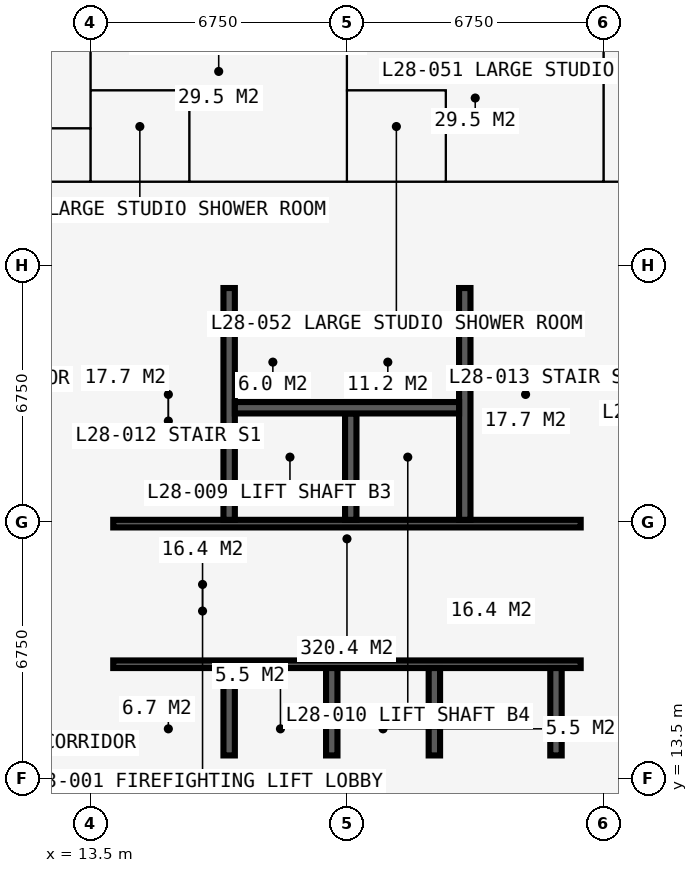
"""IFC4 building model, lengths in metres.
Left out: names, types, materials, properties, quantities, classifications, styles, units other than length and angle.
Written with IfcOpenShell. Run it as: python <this file> out.ifc"""

import sys

from ifc_helpers import new_model, si_unit, direction, frame, frame_2d, origin, place, context, subcontext, project, spatial, rectangle, extrude, element, fill, save


model = new_model("IFC4")
c1 = context("Model", 3, precision=1e-05, world=origin(), true_north=direction((0.0, 1.0)))
c2 = subcontext(c1, "Body", "Model", "MODEL_VIEW")
j1 = project(units=[si_unit("LENGTHUNIT", "METRE"), si_unit("PLANEANGLEUNIT", "RADIAN")], contexts=[c1])
p1 = place(None, origin())
s1 = spatial("IfcSite", under=j1, at=p1, CompositionType="ELEMENT")
p2 = place(p1, origin())
s2 = spatial("IfcBuilding", under=s1, at=p2, CompositionType="ELEMENT")
p3 = place(p2, frame((0.0, 0.0, 105.3)))
s3 = spatial("IfcBuildingStorey", under=s2, at=p3, CompositionType="ELEMENT", Elevation=105.3)
p4 = place(p3, frame((12.9, 13.5, 0.0), z_axis=(0.0, 0.0, 1.0), x_axis=(1.0, 0.0, 0.0)))
e1 = element("IfcWall", 1, at=p4, inside=s3, PredefinedType="SHEAR", context=c2, shape_type="SweptSolid", body=[
    extrude(rectangle(XDim=14.7, YDim=1.2, at=frame_2d((7.35, 0.0))), origin(), (0.0, 0.0, 1.0), 3.6),
])
p5 = place(p3, frame((27.0, 14.1, 0.0), z_axis=(0.0, 0.0, 1.0), x_axis=(0.0, 1.0, 0.0)))
e2 = element("IfcWall", 2, at=p5, inside=s3, PredefinedType="SHEAR", context=c2, shape_type="SweptSolid", body=[
    extrude(rectangle(XDim=12.3, YDim=1.2, at=frame_2d((6.15, 0.0))), origin(), (0.0, 0.0, 1.0), 3.6),
])
p6 = place(p5, frame((3.65, 0.0, 0.0)))
e3 = element("IfcOpeningElement", 3, at=p6, cuts=e2, PredefinedType="OPENING", context=c2, shape_type="SweptSolid", body=[
    extrude(rectangle(XDim=1.2, YDim=2.2, at=frame_2d((0.6, 1.1))), frame((0.0, 0.61, 0.0), z_axis=(0.0, -1.0, 0.0), x_axis=(1.0, 0.0, 0.0)), (0.0, 0.0, 1.0), 1.22),
])
p7 = place(p3, frame((27.6, 27.0, 0.0), z_axis=(0.0, 0.0, 1.0), x_axis=(-1.0, 0.0, 0.0)))
e4 = element("IfcWall", 4, at=p7, inside=s3, PredefinedType="SHEAR", context=c2, shape_type="SweptSolid", body=[
    extrude(rectangle(XDim=14.7, YDim=1.2, at=frame_2d((7.35, 0.0))), origin(), (0.0, 0.0, 1.0), 3.6),
])
p8 = place(p7, frame((5.225, 0.0, 0.0)))
e5 = element("IfcOpeningElement", 5, at=p8, cuts=e4, PredefinedType="OPENING", context=c2, shape_type="SweptSolid", body=[
    extrude(rectangle(XDim=0.9, YDim=2.2, at=frame_2d((0.45, 1.1))), frame((0.0, 0.61, 0.0), z_axis=(0.0, -1.0, 0.0), x_axis=(1.0, 0.0, 0.0)), (0.0, 0.0, 1.0), 1.22),
])
p9 = place(p7, frame((8.2, 0.0, 0.0)))
e6 = element("IfcOpeningElement", 6, at=p9, cuts=e4, PredefinedType="OPENING", context=c2, shape_type="SweptSolid", body=[
    extrude(rectangle(XDim=1.0, YDim=2.2, at=frame_2d((0.5, 1.1))), frame((0.0, 0.61, 0.0), z_axis=(0.0, -1.0, 0.0), x_axis=(1.0, 0.0, 0.0)), (0.0, 0.0, 1.0), 1.22),
])
p10 = place(p3, frame((13.5, 26.4, 0.0), z_axis=(0.0, 0.0, 1.0), x_axis=(0.0, -1.0, 0.0)))
e7 = element("IfcWall", 7, at=p10, inside=s3, PredefinedType="SHEAR", context=c2, shape_type="SweptSolid", body=[
    extrude(rectangle(XDim=12.3, YDim=1.2, at=frame_2d((6.15, 0.0))), origin(), (0.0, 0.0, 1.0), 3.6),
])
p11 = place(p10, frame((7.45, 0.0, 0.0)))
e8 = element("IfcOpeningElement", 8, at=p11, cuts=e7, PredefinedType="OPENING", context=c2, shape_type="SweptSolid", body=[
    extrude(rectangle(XDim=1.2, YDim=2.2, at=frame_2d((0.6, 1.1))), frame((0.0, 0.61, 0.0), z_axis=(0.0, -1.0, 0.0), x_axis=(1.0, 0.0, 0.0)), (0.0, 0.0, 1.0), 1.22),
])
p12 = place(p3, frame((14.1, 16.5, 0.0), z_axis=(0.0, 0.0, 1.0), x_axis=(1.0, 0.0, 0.0)))
e9 = element("IfcWall", 9, at=p12, inside=s3, PredefinedType="SHEAR", context=c2, shape_type="SweptSolid", body=[
    extrude(rectangle(XDim=12.3, YDim=0.2, at=frame_2d((6.15, 0.0))), origin(), (0.0, 0.0, 1.0), 3.6),
])
p13 = place(p12, frame((0.9, 0.0, 0.0)))
e10 = element("IfcOpeningElement", 10, at=p13, cuts=e9, PredefinedType="OPENING", context=c2, shape_type="SweptSolid", body=[
    extrude(rectangle(XDim=1.1, YDim=2.2, at=frame_2d((0.55, 1.1))), frame((0.0, 0.11, 0.0), z_axis=(0.0, -1.0, 0.0), x_axis=(1.0, 0.0, 0.0)), (0.0, 0.0, 1.0), 0.22),
])
p14 = place(p12, frame((9.5, 0.0, 0.0)))
e11 = element("IfcOpeningElement", 11, at=p14, cuts=e9, PredefinedType="OPENING", context=c2, shape_type="SweptSolid", body=[
    extrude(rectangle(XDim=1.1, YDim=2.2, at=frame_2d((0.55, 1.1))), frame((0.0, 0.11, 0.0), z_axis=(0.0, -1.0, 0.0), x_axis=(1.0, 0.0, 0.0)), (0.0, 0.0, 1.0), 0.22),
])
p15 = place(p3, frame((14.1, 20.2, 0.0), z_axis=(0.0, 0.0, 1.0), x_axis=(1.0, 0.0, 0.0)))
e12 = element("IfcWall", 12, at=p15, inside=s3, PredefinedType="SHEAR", context=c2, shape_type="SweptSolid", body=[
    extrude(rectangle(XDim=12.3, YDim=0.2, at=frame_2d((6.15, 0.0))), origin(), (0.0, 0.0, 1.0), 3.6),
])
p16 = place(p15, frame((0.35, 0.0, 0.0)))
e13 = element("IfcOpeningElement", 13, at=p16, cuts=e12, PredefinedType="OPENING", context=c2, shape_type="SweptSolid", body=[
    extrude(rectangle(XDim=1.1, YDim=2.2, at=frame_2d((0.55, 1.1))), frame((0.0, 0.11, 0.0), z_axis=(0.0, -1.0, 0.0), x_axis=(1.0, 0.0, 0.0)), (0.0, 0.0, 1.0), 0.22),
])
p17 = place(p15, frame((9.75, 0.0, 0.0)))
e14 = element("IfcOpeningElement", 14, at=p17, cuts=e12, PredefinedType="OPENING", context=c2, shape_type="SweptSolid", body=[
    extrude(rectangle(XDim=1.1, YDim=2.2, at=frame_2d((0.55, 1.1))), frame((0.0, 0.11, 0.0), z_axis=(0.0, -1.0, 0.0), x_axis=(1.0, 0.0, 0.0)), (0.0, 0.0, 1.0), 0.22),
])
for number, where, z_axis, x_axis in (
    (15, (17.15, 20.3, 0.0), (0.0, 0.0, 1.0), (0.0, 1.0, 0.0)),
    (16, (23.35, 20.3, 0.0), (0.0, 0.0, 1.0), (0.0, 1.0, 0.0)),
):
    element("IfcWall", number, at=place(p3, frame(where, z_axis=z_axis, x_axis=x_axis)), inside=s3, PredefinedType="SHEAR", context=c2, shape_type="SweptSolid", body=[
        extrude(rectangle(XDim=6.1, YDim=0.3, at=frame_2d((3.05, 0.0))), origin(), (0.0, 0.0, 1.0), 3.6),
    ])
p18 = place(p3, frame((20.35, 20.3, 0.0), z_axis=(0.0, 0.0, 1.0), x_axis=(0.0, 1.0, 0.0)))
e17 = element("IfcWall", 17, at=p18, inside=s3, PredefinedType="SHEAR", context=c2, shape_type="SweptSolid", body=[
    extrude(rectangle(XDim=2.8, YDim=0.3, at=frame_2d((1.4, 0.0))), origin(), (0.0, 0.0, 1.0), 3.6),
])
p19 = place(p3, frame((17.3, 23.25, 0.0), z_axis=(0.0, 0.0, 1.0), x_axis=(1.0, 0.0, 0.0)))
e18 = element("IfcWall", 18, at=p19, inside=s3, PredefinedType="SHEAR", context=c2, shape_type="SweptSolid", body=[
    extrude(rectangle(XDim=5.9, YDim=0.3, at=frame_2d((2.95, 0.0))), origin(), (0.0, 0.0, 1.0), 3.6),
])
for number, where, z_axis, x_axis in (
    (19, (17.15, 14.1, 0.0), (0.0, 0.0, 1.0), (0.0, 1.0, 0.0)),
    (20, (19.85, 14.1, 0.0), (0.0, 0.0, 1.0), (0.0, 1.0, 0.0)),
    (21, (22.55, 14.1, 0.0), (0.0, 0.0, 1.0), (0.0, 1.0, 0.0)),
    (22, (25.75, 14.1, 0.0), (0.0, 0.0, 1.0), (0.0, 1.0, 0.0)),
):
    element("IfcWall", number, at=place(p3, frame(where, z_axis=z_axis, x_axis=x_axis)), inside=s3, PredefinedType="SHEAR", context=c2, shape_type="SweptSolid", body=[
        extrude(rectangle(XDim=2.3, YDim=0.3, at=frame_2d((1.15, 0.0))), origin(), (0.0, 0.0, 1.0), 3.6),
    ])
p20 = place(p3, frame((18.875, 16.6, 0.0), z_axis=(0.0, 0.0, 1.0), x_axis=(0.0, 1.0, 0.0)))
e23 = element("IfcWall", 23, at=p20, inside=s3, PredefinedType="PARTITIONING", context=c2, shape_type="SweptSolid", body=[
    extrude(rectangle(XDim=3.5, YDim=0.15, at=frame_2d((1.75, 0.0))), origin(), (0.0, 0.0, 1.0), 3.375),
])
p21 = place(p20, frame((1.15, 0.0, 0.0)))
e24 = element("IfcOpeningElement", 24, at=p21, cuts=e23, PredefinedType="OPENING", context=c2, shape_type="SweptSolid", body=[
    extrude(rectangle(XDim=1.2, YDim=2.2, at=frame_2d((0.6, 1.1))), frame((0.0, 0.085, 0.0), z_axis=(0.0, -1.0, 0.0), x_axis=(1.0, 0.0, 0.0)), (0.0, 0.0, 1.0), 0.17),
])
p22 = place(p3, frame((21.625, 16.6, 0.0), z_axis=(0.0, 0.0, 1.0), x_axis=(0.0, 1.0, 0.0)))
e25 = element("IfcWall", 25, at=p22, inside=s3, PredefinedType="PARTITIONING", context=c2, shape_type="SweptSolid", body=[
    extrude(rectangle(XDim=3.5, YDim=0.15, at=frame_2d((1.75, 0.0))), origin(), (0.0, 0.0, 1.0), 3.375),
])
p23 = place(p22, frame((1.15, 0.0, 0.0)))
e26 = element("IfcOpeningElement", 26, at=p23, cuts=e25, PredefinedType="OPENING", context=c2, shape_type="SweptSolid", body=[
    extrude(rectangle(XDim=1.2, YDim=2.2, at=frame_2d((0.6, 1.1))), frame((0.0, 0.085, 0.0), z_axis=(0.0, -1.0, 0.0), x_axis=(1.0, 0.0, 0.0)), (0.0, 0.0, 1.0), 0.17),
])
p24 = place(p3, frame((20.38, 16.6, 0.0), z_axis=(0.0, 0.0, 1.0), x_axis=(0.0, 1.0, 0.0)))
e27 = element("IfcWall", 27, at=p24, inside=s3, PredefinedType="PARTITIONING", context=c2, shape_type="SweptSolid", body=[
    extrude(rectangle(XDim=3.5, YDim=0.15, at=frame_2d((1.75, 0.0))), origin(), (0.0, 0.0, 1.0), 3.375),
])
p25 = place(p3, frame((19.375, 23.4, 0.0), z_axis=(0.0, 0.0, 1.0), x_axis=(0.0, 1.0, 0.0)))
e28 = element("IfcWall", 28, at=p25, inside=s3, PredefinedType="PARTITIONING", context=c2, shape_type="SweptSolid", body=[
    extrude(rectangle(XDim=3.0, YDim=0.15, at=frame_2d((1.5, 0.0))), origin(), (0.0, 0.0, 1.0), 3.375),
])
p26 = place(p3, frame((10.125, 30.6, 0.0), z_axis=(0.0, 0.0, 1.0), x_axis=(1.0, 0.0, 0.0)))
e29 = element("IfcWall", 29, at=p26, inside=s3, PredefinedType="PARTITIONING", context=c2, shape_type="SweptSolid", body=[
    extrude(rectangle(XDim=3.375, YDim=0.1, at=frame_2d((1.688, 0.0))), origin(), (0.0, 0.0, 1.0), 3.375),
])
p27 = place(p26, frame((2.2, 0.0, 0.0)))
e30 = element("IfcOpeningElement", 30, at=p27, cuts=e29, PredefinedType="OPENING", context=c2, shape_type="SweptSolid", body=[
    extrude(rectangle(XDim=0.95, YDim=2.2, at=frame_2d((0.475, 1.1))), frame((0.0, 0.06, 0.0), z_axis=(0.0, -1.0, 0.0), x_axis=(1.0, 0.0, 0.0)), (0.0, 0.0, 1.0), 0.12),
])
p28 = place(p3, frame((11.3, 29.2, 0.0), z_axis=(0.0, 0.0, 1.0), x_axis=(1.0, 0.0, 0.0)))
e31 = element("IfcWall", 31, at=p28, inside=s3, PredefinedType="PARTITIONING", context=c2, shape_type="SweptSolid", body=[
    extrude(rectangle(XDim=19.075, YDim=0.1, at=frame_2d((9.538, 0.0))), origin(), (0.0, 0.0, 1.0), 3.375),
])
p29 = place(p28, frame((6.4, 0.0, 0.0)))
e32 = element("IfcOpeningElement", 32, at=p29, cuts=e31, PredefinedType="OPENING", context=c2, shape_type="SweptSolid", body=[
    extrude(rectangle(XDim=0.95, YDim=2.2, at=frame_2d((0.475, 1.1))), frame((0.0, 0.06, 0.0), z_axis=(0.0, -1.0, 0.0), x_axis=(1.0, 0.0, 0.0)), (0.0, 0.0, 1.0), 0.12),
])
p30 = place(p28, frame((13.15, 0.0, 0.0)))
e33 = element("IfcOpeningElement", 33, at=p30, cuts=e31, PredefinedType="OPENING", context=c2, shape_type="SweptSolid", body=[
    extrude(rectangle(XDim=0.95, YDim=2.2, at=frame_2d((0.475, 1.1))), frame((0.0, 0.06, 0.0), z_axis=(0.0, -1.0, 0.0), x_axis=(1.0, 0.0, 0.0)), (0.0, 0.0, 1.0), 0.12),
])
p31 = place(p28, frame((0.6, 0.0, 0.0)))
e34 = element("IfcOpeningElement", 34, at=p31, cuts=e31, PredefinedType="OPENING", context=c2, shape_type="SweptSolid", body=[
    extrude(rectangle(XDim=1.0, YDim=2.2, at=frame_2d((0.5, 1.1))), frame((0.0, 0.06, 0.0), z_axis=(0.0, -1.0, 0.0), x_axis=(1.0, 0.0, 0.0)), (0.0, 0.0, 1.0), 0.12),
])
p32 = place(p3, frame((13.5, 29.2, 0.0), z_axis=(0.0, 0.0, 1.0), x_axis=(0.0, 1.0, 0.0)))
e35 = element("IfcWall", 35, at=p32, inside=s3, PredefinedType="PARTITIONING", context=c2, shape_type="SweptSolid", body=[
    extrude(rectangle(XDim=5.284, YDim=0.175, at=frame_2d((2.642, 0.0))), origin(), (0.0, 0.0, 1.0), 2.61),
])
p33 = place(p3, frame((13.5, 31.6, 0.0), z_axis=(0.0, 0.0, 1.0), x_axis=(1.0, 0.0, 0.0)))
e36 = element("IfcWall", 36, at=p33, inside=s3, PredefinedType="PARTITIONING", context=c2, shape_type="SweptSolid", body=[
    extrude(rectangle(XDim=2.6, YDim=0.1, at=frame_2d((1.3, 0.0))), origin(), (0.0, 0.0, 1.0), 3.375),
])
p34 = place(p33, frame((0.85, 0.0, 0.0)))
e37 = element("IfcOpeningElement", 37, at=p34, cuts=e36, PredefinedType="OPENING", context=c2, shape_type="SweptSolid", body=[
    extrude(rectangle(XDim=0.9, YDim=2.2, at=frame_2d((0.45, 1.1))), frame((0.0, 0.06, 0.0), z_axis=(0.0, -1.0, 0.0), x_axis=(1.0, 0.0, 0.0)), (0.0, 0.0, 1.0), 0.12),
])
p35 = place(p3, frame((16.1, 29.2, 0.0), z_axis=(0.0, 0.0, 1.0), x_axis=(0.0, 1.0, 0.0)))
e38 = element("IfcWall", 38, at=p35, inside=s3, PredefinedType="PARTITIONING", context=c2, shape_type="SweptSolid", body=[
    extrude(rectangle(XDim=2.4, YDim=0.1, at=frame_2d((1.2, 0.0))), origin(), (0.0, 0.0, 1.0), 3.375),
])
p36 = place(p3, frame((20.25, 29.2, 0.0), z_axis=(0.0, 0.0, 1.0), x_axis=(0.0, 1.0, 0.0)))
e39 = element("IfcWall", 39, at=p36, inside=s3, PredefinedType="PARTITIONING", context=c2, shape_type="SweptSolid", body=[
    extrude(rectangle(XDim=5.284, YDim=0.175, at=frame_2d((2.642, 0.0))), origin(), (0.0, 0.0, 1.0), 2.61),
])
p37 = place(p36, frame((0.75, 0.0, 0.0)))
e40 = element("IfcOpeningElement", 40, at=p37, cuts=e39, PredefinedType="OPENING", context=c2, shape_type="SweptSolid", body=[
    extrude(rectangle(XDim=0.9, YDim=2.2, at=frame_2d((0.45, 1.1))), frame((0.0, 0.097, 0.0), z_axis=(0.0, -1.0, 0.0), x_axis=(1.0, 0.0, 0.0)), (0.0, 0.0, 1.0), 0.195),
])
p38 = place(p3, frame((20.25, 31.6, 0.0), z_axis=(0.0, 0.0, 1.0), x_axis=(1.0, 0.0, 0.0)))
e41 = element("IfcWall", 41, at=p38, inside=s3, PredefinedType="PARTITIONING", context=c2, shape_type="SweptSolid", body=[
    extrude(rectangle(XDim=2.6, YDim=0.1, at=frame_2d((1.3, 0.0))), origin(), (0.0, 0.0, 1.0), 3.375),
])
p39 = place(p3, frame((22.85, 29.2, 0.0), z_axis=(0.0, 0.0, 1.0), x_axis=(0.0, 1.0, 0.0)))
e42 = element("IfcWall", 42, at=p39, inside=s3, PredefinedType="PARTITIONING", context=c2, shape_type="SweptSolid", body=[
    extrude(rectangle(XDim=2.4, YDim=0.1, at=frame_2d((1.2, 0.0))), origin(), (0.0, 0.0, 1.0), 3.375),
])
p40 = place(p3, frame((27.0, 29.2, 0.0), z_axis=(0.0, 0.0, 1.0), x_axis=(0.0, 1.0, 0.0)))
e43 = element("IfcWall", 43, at=p40, inside=s3, PredefinedType="PARTITIONING", context=c2, shape_type="SweptSolid", body=[
    extrude(rectangle(XDim=5.284, YDim=0.15, at=frame_2d((2.642, 0.0))), origin(), (0.0, 0.0, 1.0), 2.61),
])
p41 = place(p13, origin())
e44 = element("IfcDoor", 44, at=p41, inside=s3, OperationType="DOUBLE_DOOR_SLIDING", PredefinedType="DOOR", context=c2, shape_type="SweptSolid", body=[
    extrude(rectangle(XDim=1.1, YDim=2.2, at=frame_2d((0.55, 1.1))), frame((0.0, 0.025, 0.0), z_axis=(0.0, -1.0, 0.0), x_axis=(1.0, 0.0, 0.0)), (0.0, 0.0, 1.0), 0.05),
])
fill(e10, e44)
p42 = place(p14, origin())
e45 = element("IfcDoor", 45, at=p42, inside=s3, OperationType="DOUBLE_DOOR_SLIDING", PredefinedType="DOOR", context=c2, shape_type="SweptSolid", body=[
    extrude(rectangle(XDim=1.1, YDim=2.2, at=frame_2d((0.55, 1.1))), frame((0.0, 0.025, 0.0), z_axis=(0.0, -1.0, 0.0), x_axis=(1.0, 0.0, 0.0)), (0.0, 0.0, 1.0), 0.05),
])
fill(e11, e45)
p43 = place(p11, origin())
e46 = element("IfcDoor", 46, at=p43, inside=s3, OperationType="DOUBLE_DOOR_SINGLE_SWING", PredefinedType="DOOR", context=c2, shape_type="SweptSolid", body=[
    extrude(rectangle(XDim=1.2, YDim=2.2, at=frame_2d((0.6, 1.1))), frame((0.0, 0.025, 0.0), z_axis=(0.0, -1.0, 0.0), x_axis=(1.0, 0.0, 0.0)), (0.0, 0.0, 1.0), 0.05),
])
fill(e8, e46)
p44 = place(p6, origin())
e47 = element("IfcDoor", 47, at=p44, inside=s3, OperationType="DOUBLE_DOOR_SINGLE_SWING", PredefinedType="DOOR", context=c2, shape_type="SweptSolid", body=[
    extrude(rectangle(XDim=1.2, YDim=2.2, at=frame_2d((0.6, 1.1))), frame((0.0, 0.025, 0.0), z_axis=(0.0, -1.0, 0.0), x_axis=(1.0, 0.0, 0.0)), (0.0, 0.0, 1.0), 0.05),
])
fill(e3, e47)
p45 = place(p21, origin())
e48 = element("IfcDoor", 48, at=p45, inside=s3, OperationType="DOUBLE_DOOR_SINGLE_SWING", PredefinedType="DOOR", context=c2, shape_type="SweptSolid", body=[
    extrude(rectangle(XDim=1.2, YDim=2.2, at=frame_2d((0.6, 1.1))), frame((0.0, 0.025, 0.0), z_axis=(0.0, -1.0, 0.0), x_axis=(1.0, 0.0, 0.0)), (0.0, 0.0, 1.0), 0.05),
])
fill(e24, e48)
p46 = place(p23, origin())
e49 = element("IfcDoor", 49, at=p46, inside=s3, OperationType="DOUBLE_DOOR_SINGLE_SWING", PredefinedType="DOOR", context=c2, shape_type="SweptSolid", body=[
    extrude(rectangle(XDim=1.2, YDim=2.2, at=frame_2d((0.6, 1.1))), frame((0.0, 0.025, 0.0), z_axis=(0.0, -1.0, 0.0), x_axis=(1.0, 0.0, 0.0)), (0.0, 0.0, 1.0), 0.05),
])
fill(e26, e49)
p47 = place(p8, origin())
e50 = element("IfcDoor", 50, at=p47, inside=s3, OperationType="SINGLE_SWING_LEFT", PredefinedType="DOOR", context=c2, shape_type="SweptSolid", body=[
    extrude(rectangle(XDim=0.9, YDim=2.2, at=frame_2d((0.45, 1.1))), frame((0.0, 0.4, 0.0), z_axis=(0.0, -1.0, 0.0), x_axis=(1.0, 0.0, 0.0)), (0.0, 0.0, 1.0), 0.8),
])
fill(e5, e50)
p48 = place(p9, origin())
e51 = element("IfcDoor", 51, at=p48, inside=s3, OperationType="SINGLE_SWING_LEFT", PredefinedType="DOOR", context=c2, shape_type="SweptSolid", body=[
    extrude(rectangle(XDim=1.0, YDim=2.2, at=frame_2d((0.5, 1.1))), frame((0.0, 0.025, 0.0), z_axis=(0.0, -1.0, 0.0), x_axis=(1.0, 0.0, 0.0)), (0.0, 0.0, 1.0), 0.05),
])
fill(e6, e51)
p49 = place(p16, origin())
e52 = element("IfcDoor", 52, at=p49, inside=s3, OperationType="SINGLE_SWING_LEFT", PredefinedType="DOOR", context=c2, shape_type="SweptSolid", body=[
    extrude(rectangle(XDim=1.1, YDim=2.2, at=frame_2d((0.55, 1.1))), frame((0.0, 0.025, 0.0), z_axis=(0.0, -1.0, 0.0), x_axis=(1.0, 0.0, 0.0)), (0.0, 0.0, 1.0), 0.05),
])
fill(e13, e52)
p50 = place(p17, origin())
e53 = element("IfcDoor", 53, at=p50, inside=s3, OperationType="SINGLE_SWING_LEFT", PredefinedType="DOOR", context=c2, shape_type="SweptSolid", body=[
    extrude(rectangle(XDim=1.1, YDim=2.2, at=frame_2d((0.55, 1.1))), frame((0.0, 0.025, 0.0), z_axis=(0.0, -1.0, 0.0), x_axis=(1.0, 0.0, 0.0)), (0.0, 0.0, 1.0), 0.05),
])
fill(e14, e53)
p51 = place(p29, origin())
e54 = element("IfcDoor", 54, at=p51, inside=s3, OperationType="SINGLE_SWING_LEFT", PredefinedType="DOOR", context=c2, shape_type="SweptSolid", body=[
    extrude(rectangle(XDim=0.95, YDim=2.2, at=frame_2d((0.475, 1.1))), frame((0.0, 0.025, 0.0), z_axis=(0.0, -1.0, 0.0), x_axis=(1.0, 0.0, 0.0)), (0.0, 0.0, 1.0), 0.05),
])
fill(e32, e54)
p52 = place(p34, origin())
e55 = element("IfcDoor", 55, at=p52, inside=s3, OperationType="SINGLE_SWING_RIGHT", PredefinedType="DOOR", context=c2, shape_type="SweptSolid", body=[
    extrude(rectangle(XDim=0.9, YDim=2.2, at=frame_2d((0.45, 1.1))), frame((0.0, 0.025, 0.0), z_axis=(0.0, -1.0, 0.0), x_axis=(1.0, 0.0, 0.0)), (0.0, 0.0, 1.0), 0.05),
])
fill(e37, e55)
p53 = place(p30, origin())
e56 = element("IfcDoor", 56, at=p53, inside=s3, OperationType="SINGLE_SWING_LEFT", PredefinedType="DOOR", context=c2, shape_type="SweptSolid", body=[
    extrude(rectangle(XDim=0.95, YDim=2.2, at=frame_2d((0.475, 1.1))), frame((0.0, 0.025, 0.0), z_axis=(0.0, -1.0, 0.0), x_axis=(1.0, 0.0, 0.0)), (0.0, 0.0, 1.0), 0.05),
])
fill(e33, e56)
p54 = place(p37, origin())
e57 = element("IfcDoor", 57, at=p54, inside=s3, OperationType="SINGLE_SWING_RIGHT", PredefinedType="DOOR", context=c2, shape_type="SweptSolid", body=[
    extrude(rectangle(XDim=0.9, YDim=2.2, at=frame_2d((0.45, 1.1))), frame((0.0, 0.025, 0.0), z_axis=(0.0, -1.0, 0.0), x_axis=(1.0, 0.0, 0.0)), (0.0, 0.0, 1.0), 0.05),
])
fill(e40, e57)
p55 = place(p27, origin())
e58 = element("IfcDoor", 58, at=p55, inside=s3, OperationType="SINGLE_SWING_LEFT", PredefinedType="DOOR", context=c2, shape_type="SweptSolid", body=[
    extrude(rectangle(XDim=0.95, YDim=2.2, at=frame_2d((0.475, 1.1))), frame((0.0, 0.025, 0.0), z_axis=(0.0, -1.0, 0.0), x_axis=(1.0, 0.0, 0.0)), (0.0, 0.0, 1.0), 0.05),
])
fill(e30, e58)
p56 = place(p31, origin())
e59 = element("IfcDoor", 59, at=p56, inside=s3, OperationType="SINGLE_SWING_LEFT", PredefinedType="DOOR", context=c2, shape_type="SweptSolid", body=[
    extrude(rectangle(XDim=1.0, YDim=2.2, at=frame_2d((0.5, 1.1))), frame((0.0, 0.025, 0.0), z_axis=(0.0, -1.0, 0.0), x_axis=(1.0, 0.0, 0.0)), (0.0, 0.0, 1.0), 0.05),
])
fill(e34, e59)
save(model, sys.argv[1])
